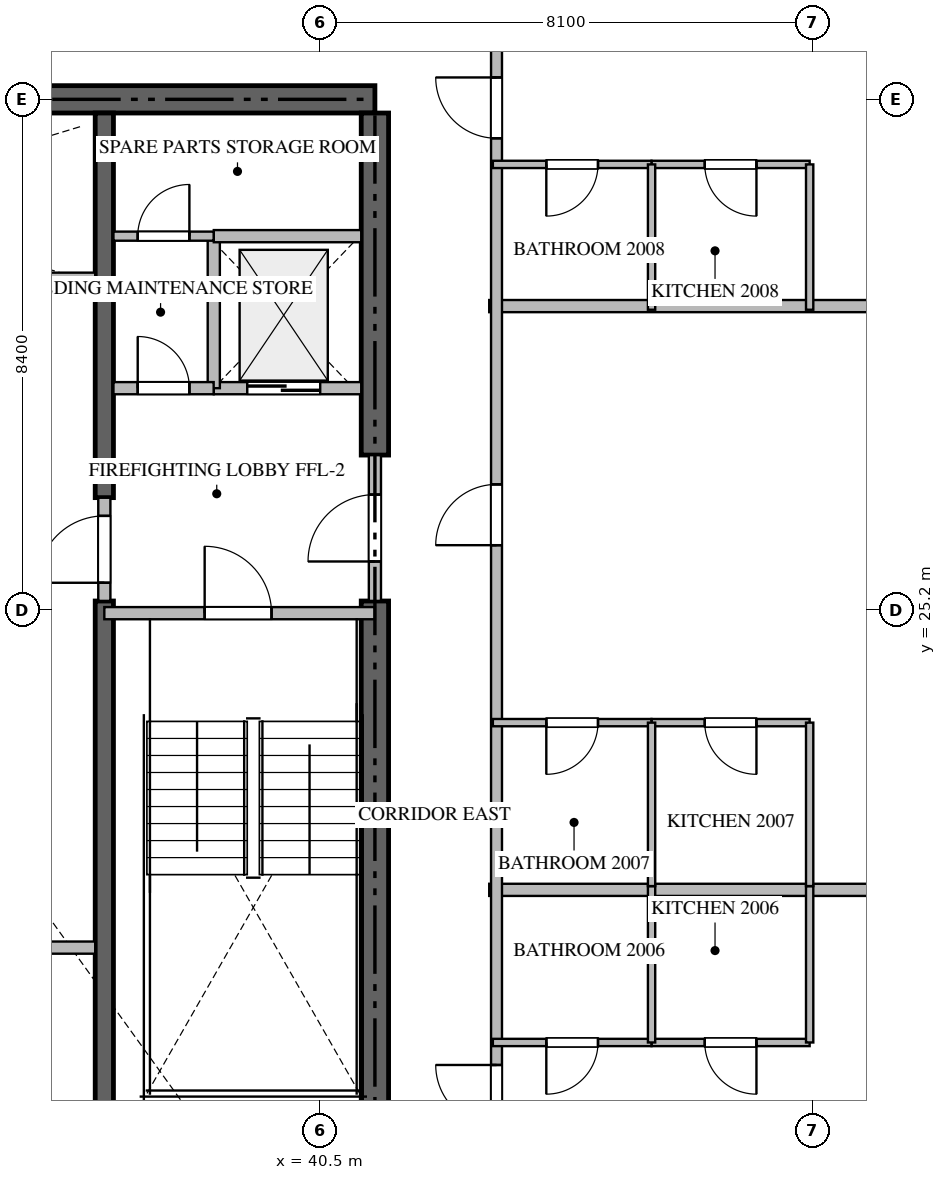
"""IFC4 building model, lengths in metres.
Left out: names, types, materials, properties, quantities, classifications, styles, units other than length and angle.
Written with IfcOpenShell. Run it as: python <this file> out.ifc"""

import sys

from ifc_helpers import new_model, si_unit, direction, frame, frame_2d, origin, place, context, subcontext, project, spatial, rectangle, extrude, source, transform, mapped, element, fill, save


model = new_model("IFC4")
c1 = context("Model", 3, precision=1e-05, world=origin(), true_north=direction((0.0, 1.0)))
c2 = subcontext(c1, "Body", "Model", "MODEL_VIEW")
j1 = project(units=[si_unit("LENGTHUNIT", "METRE"), si_unit("PLANEANGLEUNIT", "RADIAN")], contexts=[c1])
p1 = place(None, origin())
s1 = spatial("IfcSite", under=j1, at=p1, CompositionType="ELEMENT")
p2 = place(p1, origin())
s2 = spatial("IfcBuilding", under=s1, at=p2, CompositionType="ELEMENT")
p3 = place(p2, frame((0.0, 0.0, 82.95)))
s3 = spatial("IfcBuildingStorey", under=s2, at=p3, CompositionType="ELEMENT", Elevation=82.95)
p4 = place(p3, frame((41.4, 33.6, -0.26), z_axis=(0.0, 0.0, 1.0), x_axis=(-1.0, 0.0, 0.0)))
e1 = element("IfcWall", 1, at=p4, inside=s3, PredefinedType="SHEAR", context=c2, shape_type="SweptSolid", body=[
    extrude(rectangle(XDim=18.0, YDim=0.45, at=frame_2d((9.0, 0.0))), origin(), (0.0, 0.0, 1.0), 3.748),
])
p5 = place(p3, frame((41.4, 17.025, -0.26), z_axis=(0.0, 0.0, 1.0), x_axis=(0.0, 1.0, 0.0)))
e2 = element("IfcWall", 2, at=p5, inside=s3, PredefinedType="SHEAR", context=c2, shape_type="SweptSolid", body=[
    extrude(rectangle(XDim=8.325, YDim=0.45, at=frame_2d((4.163, 0.0))), origin(), (0.0, 0.0, 1.0), 3.748),
])
p6 = place(p3, frame((41.4, 27.75, -0.26), z_axis=(0.0, 0.0, 1.0), x_axis=(0.0, 1.0, 0.0)))
e3 = element("IfcWall", 3, at=p6, inside=s3, PredefinedType="SHEAR", context=c2, shape_type="SweptSolid", body=[
    extrude(rectangle(XDim=5.625, YDim=0.45, at=frame_2d((2.812, 0.0))), origin(), (0.0, 0.0, 1.0), 3.748),
])
p7 = place(p3, frame((36.95, 17.025, -0.26), z_axis=(0.0, 0.0, 1.0), x_axis=(0.0, 1.0, 0.0)))
e4 = element("IfcWall", 4, at=p7, inside=s3, PredefinedType="SHEAR", context=c2, shape_type="SweptSolid", body=[
    extrude(rectangle(XDim=8.325, YDim=0.3, at=frame_2d((4.163, 0.0))), origin(), (0.0, 0.0, 1.0), 3.748),
])
p8 = place(p3, frame((36.95, 27.05, -0.26), z_axis=(0.0, 0.0, 1.0), x_axis=(0.0, 1.0, 0.0)))
e5 = element("IfcWall", 5, at=p8, inside=s3, PredefinedType="SHEAR", context=c2, shape_type="SweptSolid", body=[
    extrude(rectangle(XDim=6.325, YDim=0.3, at=frame_2d((3.163, 0.0))), origin(), (0.0, 0.0, 1.0), 3.748),
])
p9 = place(p3, frame((36.95, 25.15, 0.0), z_axis=(0.0, 0.0, 1.0), x_axis=(1.0, 0.0, 0.0)))
e6 = element("IfcWall", 6, at=p9, inside=s3, PredefinedType="STANDARD", context=c2, shape_type="SweptSolid", body=[
    extrude(rectangle(XDim=4.45, YDim=0.2, at=frame_2d((2.225, 0.0))), origin(), (0.0, 0.0, 1.0), 3.49),
])
p10 = place(p9, frame((1.65, 0.0, 0.0)))
e7 = element("IfcOpeningElement", 7, at=p10, cuts=e6, PredefinedType="OPENING", context=c2, shape_type="SweptSolid", body=[
    extrude(rectangle(XDim=1.1, YDim=2.15, at=frame_2d((0.55, 1.075))), frame((0.0, 0.11, 0.0), z_axis=(0.0, -1.0, 0.0), x_axis=(1.0, 0.0, 0.0)), (0.0, 0.0, 1.0), 0.22),
])
p11 = place(p3, frame((38.75, 28.85, 0.0), z_axis=(0.0, 0.0, 1.0), x_axis=(1.0, 0.0, 0.0)))
e8 = element("IfcWall", 8, at=p11, inside=s3, PredefinedType="STANDARD", context=c2, shape_type="SweptSolid", body=[
    extrude(rectangle(XDim=2.425, YDim=0.2, at=frame_2d((1.212, 0.0))), origin(), (0.0, 0.0, 1.0), 3.49),
])
p12 = place(p11, frame((0.55, 0.0, 0.0)))
e9 = element("IfcOpeningElement", 9, at=p12, cuts=e8, PredefinedType="OPENING", context=c2, shape_type="SweptSolid", body=[
    extrude(rectangle(XDim=1.2, YDim=2.2, at=frame_2d((0.6, 1.1))), frame((0.0, 0.11, 0.0), z_axis=(0.0, -1.0, 0.0), x_axis=(1.0, 0.0, 0.0)), (0.0, 0.0, 1.0), 0.22),
])
p13 = place(p3, frame((33.05, 19.65, 0.0), z_axis=(0.0, 0.0, 1.0), x_axis=(1.0, 0.0, 0.0)))
e10 = element("IfcWall", 10, at=p13, inside=s3, PredefinedType="STANDARD", context=c2, shape_type="SweptSolid", body=[
    extrude(rectangle(XDim=3.75, YDim=0.2, at=frame_2d((1.875, 0.0))), origin(), (0.0, 0.0, 1.0), 3.49),
])
p14 = place(p13, frame((0.65, 0.0, 0.0)))
e11 = element("IfcOpeningElement", 11, at=p14, cuts=e10, PredefinedType="OPENING", context=c2, shape_type="SweptSolid", body=[
    extrude(rectangle(XDim=1.1, YDim=2.2, at=frame_2d((0.55, 1.1))), frame((0.0, 0.11, 0.0), z_axis=(0.0, -1.0, 0.0), x_axis=(1.0, 0.0, 0.0)), (0.0, 0.0, 1.0), 0.22),
])
p15 = place(p3, frame((35.0, 30.65, 0.0), z_axis=(0.0, 0.0, 1.0), x_axis=(1.0, 0.0, 0.0)))
e12 = element("IfcWall", 12, at=p15, inside=s3, PredefinedType="STANDARD", context=c2, shape_type="SweptSolid", body=[
    extrude(rectangle(XDim=1.8, YDim=0.2, at=frame_2d((0.9, 0.0))), origin(), (0.0, 0.0, 1.0), 3.49),
])
p16 = place(p3, frame((38.75, 28.85, 0.0), z_axis=(0.0, 0.0, 1.0), x_axis=(0.0, 1.0, 0.0)))
e13 = element("IfcWall", 13, at=p16, inside=s3, PredefinedType="STANDARD", context=c2, shape_type="SweptSolid", body=[
    extrude(rectangle(XDim=2.5, YDim=0.2, at=frame_2d((1.25, 0.0))), origin(), (0.0, 0.0, 1.0), 3.49),
])
p17 = place(p3, frame((38.75, 31.35, 0.0), z_axis=(0.0, 0.0, 1.0), x_axis=(1.0, 0.0, 0.0)))
e14 = element("IfcWall", 14, at=p17, inside=s3, PredefinedType="STANDARD", context=c2, shape_type="SweptSolid", body=[
    extrude(rectangle(XDim=2.425, YDim=0.2, at=frame_2d((1.212, 0.0))), origin(), (0.0, 0.0, 1.0), 3.49),
])
p18 = place(p3, frame((37.1, 28.85, 0.0), z_axis=(0.0, 0.0, 1.0), x_axis=(1.0, 0.0, 0.0)))
e15 = element("IfcWall", 15, at=p18, inside=s3, PredefinedType="STANDARD", context=c2, shape_type="SweptSolid", body=[
    extrude(rectangle(XDim=1.648, YDim=0.2, at=frame_2d((0.824, 0.0))), origin(), (0.0, 0.0, 1.0), 3.49),
])
p19 = place(p18, frame((0.399, 0.0, 0.0)))
e16 = element("IfcOpeningElement", 16, at=p19, cuts=e15, PredefinedType="OPENING", context=c2, shape_type="SweptSolid", body=[
    extrude(rectangle(XDim=0.85, YDim=2.1, at=frame_2d((0.425, 1.05))), frame((0.0, 0.11, 0.0), z_axis=(0.0, -1.0, 0.0), x_axis=(1.0, 0.0, 0.0)), (0.0, 0.0, 1.0), 0.22),
])
p20 = place(p3, frame((41.4, 25.352, 0.0), z_axis=(0.0, 0.0, 1.0), x_axis=(0.0, 1.0, 0.0)))
e17 = element("IfcWall", 17, at=p20, inside=s3, PredefinedType="STANDARD", context=c2, shape_type="SweptSolid", body=[
    extrude(rectangle(XDim=2.396, YDim=0.2, at=frame_2d((1.198, 0.0))), origin(), (0.0, 0.0, 1.0), 3.49),
])
p21 = place(p20, frame((0.648, 0.0, 0.0)))
e18 = element("IfcOpeningElement", 18, at=p21, cuts=e17, PredefinedType="OPENING", context=c2, shape_type="SweptSolid", body=[
    extrude(rectangle(XDim=1.1, YDim=2.15, at=frame_2d((0.55, 1.075))), frame((0.0, 0.11, 0.0), z_axis=(0.0, -1.0, 0.0), x_axis=(1.0, 0.0, 0.0)), (0.0, 0.0, 1.0), 0.22),
])
p22 = place(p3, frame((36.95, 25.352, 0.0), z_axis=(0.0, 0.0, 1.0), x_axis=(0.0, 1.0, 0.0)))
e19 = element("IfcWall", 19, at=p22, inside=s3, PredefinedType="STANDARD", context=c2, shape_type="SweptSolid", body=[
    extrude(rectangle(XDim=1.696, YDim=0.2, at=frame_2d((0.848, 0.0))), origin(), (0.0, 0.0, 1.0), 3.49),
])
p23 = place(p22, frame((0.298, 0.0, 0.0)))
e20 = element("IfcOpeningElement", 20, at=p23, cuts=e19, PredefinedType="OPENING", context=c2, shape_type="SweptSolid", body=[
    extrude(rectangle(XDim=1.1, YDim=2.15, at=frame_2d((0.55, 1.075))), frame((0.0, 0.11, 0.0), z_axis=(0.0, -1.0, 0.0), x_axis=(1.0, 0.0, 0.0)), (0.0, 0.0, 1.0), 0.22),
])
p24 = place(p3, frame((37.1, 31.35, 0.0), z_axis=(0.0, 0.0, 1.0), x_axis=(1.0, 0.0, 0.0)))
e21 = element("IfcWall", 21, at=p24, inside=s3, PredefinedType="PARTITIONING", context=c2, shape_type="SweptSolid", body=[
    extrude(rectangle(XDim=1.648, YDim=0.15, at=frame_2d((0.824, 0.0))), origin(), (0.0, 0.0, 1.0), 3.49),
])
p25 = place(p24, frame((0.399, 0.0, 0.0)))
e22 = element("IfcOpeningElement", 22, at=p25, cuts=e21, PredefinedType="OPENING", context=c2, shape_type="SweptSolid", body=[
    extrude(rectangle(XDim=0.85, YDim=2.1, at=frame_2d((0.425, 1.05))), frame((0.0, 0.085, 0.0), z_axis=(0.0, -1.0, 0.0), x_axis=(1.0, 0.0, 0.0)), (0.0, 0.0, 1.0), 0.17),
])
for number, where, z_axis, x_axis in (
    (23, (43.28, 20.6, 0.0), (0.0, 0.0, 1.0), (1.0, 0.0, 0.0)),
    (24, (43.28, 30.2, 0.0), (0.0, 0.0, 1.0), (1.0, 0.0, 0.0)),
):
    element("IfcWall", number, at=place(p3, frame(where, z_axis=z_axis, x_axis=x_axis)), inside=s3, PredefinedType="PARTITIONING", context=c2, shape_type="SweptSolid", body=[
        extrude(rectangle(XDim=15.438, YDim=0.2, at=frame_2d((7.719, 0.0))), origin(), (0.0, 0.0, 1.0), 3.49),
    ])
p26 = place(p3, frame((43.4, 14.9, 0.0), z_axis=(0.0, 0.0, 1.0), x_axis=(0.0, 1.0, 0.0)))
e25 = element("IfcWall", 25, at=p26, inside=s3, PredefinedType="PARTITIONING", context=c2, shape_type="SweptSolid", body=[
    extrude(rectangle(XDim=20.6, YDim=0.18, at=frame_2d((10.3, 0.0))), origin(), (0.0, 0.0, 1.0), 3.49),
])
p27 = place(p26, frame((1.82, 0.0, 0.0)))
e26 = element("IfcOpeningElement", 26, at=p27, cuts=e25, PredefinedType="OPENING", context=c2, shape_type="SweptSolid", body=[
    extrude(rectangle(XDim=1.0, YDim=2.15, at=frame_2d((0.5, 1.075))), frame((0.0, 0.1, 0.0), z_axis=(0.0, -1.0, 0.0), x_axis=(1.0, 0.0, 0.0)), (0.0, 0.0, 1.0), 0.2),
])
p28 = place(p26, frame((11.368, 0.0, 0.0)))
e27 = element("IfcOpeningElement", 27, at=p28, cuts=e25, PredefinedType="OPENING", context=c2, shape_type="SweptSolid", body=[
    extrude(rectangle(XDim=1.0, YDim=2.15, at=frame_2d((0.5, 1.075))), frame((0.0, 0.1, 0.0), z_axis=(0.0, -1.0, 0.0), x_axis=(1.0, 0.0, 0.0)), (0.0, 0.0, 1.0), 0.2),
])
p29 = place(p26, frame((18.06, 0.0, 0.0)))
e28 = element("IfcOpeningElement", 28, at=p29, cuts=e25, PredefinedType="OPENING", context=c2, shape_type="SweptSolid", body=[
    extrude(rectangle(XDim=1.0, YDim=2.15, at=frame_2d((0.5, 1.075))), frame((0.0, 0.1, 0.0), z_axis=(0.0, -1.0, 0.0), x_axis=(1.0, 0.0, 0.0)), (0.0, 0.0, 1.0), 0.2),
])
p30 = place(p3, frame((48.55, 18.09, 0.0), z_axis=(0.0, 0.0, 1.0), x_axis=(-1.0, 0.0, 0.0)))
e29 = element("IfcWall", 29, at=p30, inside=s3, PredefinedType="PARTITIONING", context=c2, shape_type="SweptSolid", body=[
    extrude(rectangle(XDim=2.6, YDim=0.12, at=frame_2d((1.3, 0.0))), origin(), (0.0, 0.0, 1.0), 3.49),
])
p31 = place(p30, frame((0.875, 0.0, 0.0)))
e30 = element("IfcOpeningElement", 30, at=p31, cuts=e29, PredefinedType="OPENING", context=c2, shape_type="SweptSolid", body=[
    extrude(rectangle(XDim=0.85, YDim=2.1, at=frame_2d((0.425, 1.05))), frame((0.0, 0.07, 0.0), z_axis=(0.0, -1.0, 0.0), x_axis=(1.0, 0.0, 0.0)), (0.0, 0.0, 1.0), 0.14),
])
p32 = place(p3, frame((45.948, 18.09, 0.0), z_axis=(0.0, 0.0, 1.0), x_axis=(-1.0, 0.0, 0.0)))
e31 = element("IfcWall", 31, at=p32, inside=s3, PredefinedType="PARTITIONING", context=c2, shape_type="SweptSolid", body=[
    extrude(rectangle(XDim=2.608, YDim=0.12, at=frame_2d((1.304, 0.0))), origin(), (0.0, 0.0, 1.0), 3.49),
])
p33 = place(p32, frame((0.879, 0.0, 0.0)))
e32 = element("IfcOpeningElement", 32, at=p33, cuts=e31, PredefinedType="OPENING", context=c2, shape_type="SweptSolid", body=[
    extrude(rectangle(XDim=0.85, YDim=2.1, at=frame_2d((0.425, 1.05))), frame((0.0, 0.07, 0.0), z_axis=(0.0, -1.0, 0.0), x_axis=(1.0, 0.0, 0.0)), (0.0, 0.0, 1.0), 0.14),
])
for number, where, z_axis, x_axis in (
    (33, (45.95, 18.09, 0.0), (0.0, 0.0, 1.0), (0.0, 1.0, 0.0)),
    (34, (48.55, 18.09, 0.0), (0.0, 0.0, 1.0), (0.0, 1.0, 0.0)),
):
    element("IfcWall", number, at=place(p3, frame(where, z_axis=z_axis, x_axis=x_axis)), inside=s3, PredefinedType="PARTITIONING", context=c2, shape_type="SweptSolid", body=[
        extrude(rectangle(XDim=2.57, YDim=0.12, at=frame_2d((1.285, 0.0))), origin(), (0.0, 0.0, 1.0), 3.49),
    ])
p34 = place(p3, frame((48.55, 23.35, 0.0), z_axis=(0.0, 0.0, 1.0), x_axis=(-1.0, 0.0, 0.0)))
e35 = element("IfcWall", 35, at=p34, inside=s3, PredefinedType="PARTITIONING", context=c2, shape_type="SweptSolid", body=[
    extrude(rectangle(XDim=2.6, YDim=0.12, at=frame_2d((1.3, 0.0))), origin(), (0.0, 0.0, 1.0), 3.49),
])
p35 = place(p34, frame((0.875, 0.0, 0.0)))
e36 = element("IfcOpeningElement", 36, at=p35, cuts=e35, PredefinedType="OPENING", context=c2, shape_type="SweptSolid", body=[
    extrude(rectangle(XDim=0.85, YDim=2.1, at=frame_2d((0.425, 1.05))), frame((0.0, 0.07, 0.0), z_axis=(0.0, -1.0, 0.0), x_axis=(1.0, 0.0, 0.0)), (0.0, 0.0, 1.0), 0.14),
])
p36 = place(p3, frame((45.948, 23.35, 0.0), z_axis=(0.0, 0.0, 1.0), x_axis=(-1.0, 0.0, 0.0)))
e37 = element("IfcWall", 37, at=p36, inside=s3, PredefinedType="PARTITIONING", context=c2, shape_type="SweptSolid", body=[
    extrude(rectangle(XDim=2.608, YDim=0.12, at=frame_2d((1.304, 0.0))), origin(), (0.0, 0.0, 1.0), 3.49),
])
p37 = place(p36, frame((0.879, 0.0, 0.0)))
e38 = element("IfcOpeningElement", 38, at=p37, cuts=e37, PredefinedType="OPENING", context=c2, shape_type="SweptSolid", body=[
    extrude(rectangle(XDim=0.85, YDim=2.1, at=frame_2d((0.425, 1.05))), frame((0.0, 0.07, 0.0), z_axis=(0.0, -1.0, 0.0), x_axis=(1.0, 0.0, 0.0)), (0.0, 0.0, 1.0), 0.14),
])
for number, where, z_axis, x_axis in (
    (39, (45.95, 20.662, 0.0), (0.0, 0.0, 1.0), (0.0, 1.0, 0.0)),
    (40, (48.55, 20.662, 0.0), (0.0, 0.0, 1.0), (0.0, 1.0, 0.0)),
):
    element("IfcWall", number, at=place(p3, frame(where, z_axis=z_axis, x_axis=x_axis)), inside=s3, PredefinedType="PARTITIONING", context=c2, shape_type="SweptSolid", body=[
        extrude(rectangle(XDim=2.688, YDim=0.12, at=frame_2d((1.344, 0.0))), origin(), (0.0, 0.0, 1.0), 3.49),
    ])
p38 = place(p3, frame((48.55, 32.53, 0.0), z_axis=(0.0, 0.0, 1.0), x_axis=(-1.0, 0.0, 0.0)))
e41 = element("IfcWall", 41, at=p38, inside=s3, PredefinedType="PARTITIONING", context=c2, shape_type="SweptSolid", body=[
    extrude(rectangle(XDim=2.6, YDim=0.12, at=frame_2d((1.3, 0.0))), origin(), (0.0, 0.0, 1.0), 3.49),
])
p39 = place(p38, frame((0.875, 0.0, 0.0)))
e42 = element("IfcOpeningElement", 42, at=p39, cuts=e41, PredefinedType="OPENING", context=c2, shape_type="SweptSolid", body=[
    extrude(rectangle(XDim=0.85, YDim=2.1, at=frame_2d((0.425, 1.05))), frame((0.0, 0.07, 0.0), z_axis=(0.0, -1.0, 0.0), x_axis=(1.0, 0.0, 0.0)), (0.0, 0.0, 1.0), 0.14),
])
p40 = place(p3, frame((45.948, 32.53, 0.0), z_axis=(0.0, 0.0, 1.0), x_axis=(-1.0, 0.0, 0.0)))
e43 = element("IfcWall", 43, at=p40, inside=s3, PredefinedType="PARTITIONING", context=c2, shape_type="SweptSolid", body=[
    extrude(rectangle(XDim=2.608, YDim=0.12, at=frame_2d((1.304, 0.0))), origin(), (0.0, 0.0, 1.0), 3.49),
])
p41 = place(p40, frame((0.879, 0.0, 0.0)))
e44 = element("IfcOpeningElement", 44, at=p41, cuts=e43, PredefinedType="OPENING", context=c2, shape_type="SweptSolid", body=[
    extrude(rectangle(XDim=0.85, YDim=2.1, at=frame_2d((0.425, 1.05))), frame((0.0, 0.07, 0.0), z_axis=(0.0, -1.0, 0.0), x_axis=(1.0, 0.0, 0.0)), (0.0, 0.0, 1.0), 0.14),
])
for number, where, z_axis, x_axis in (
    (45, (45.95, 30.14, 0.0), (0.0, 0.0, 1.0), (0.0, 1.0, 0.0)),
    (46, (48.55, 30.14, 0.0), (0.0, 0.0, 1.0), (0.0, 1.0, 0.0)),
):
    element("IfcWall", number, at=place(p3, frame(where, z_axis=z_axis, x_axis=x_axis)), inside=s3, PredefinedType="PARTITIONING", context=c2, shape_type="SweptSolid", body=[
        extrude(rectangle(XDim=2.39, YDim=0.12, at=frame_2d((1.195, 0.0))), origin(), (0.0, 0.0, 1.0), 3.49),
    ])
m1 = source(origin(), c2, "Body", "SweptSolid", [
    extrude(rectangle(XDim=1.1, YDim=2.15, at=frame_2d((0.55, 1.075))), frame((0.0, 0.025, 0.0), z_axis=(0.0, -1.0, 0.0), x_axis=(1.0, 0.0, 0.0)), (0.0, 0.0, 1.0), 0.05),
])
p42 = place(p10, origin())
e47 = element("IfcDoor", 47, at=p42, inside=s3, OperationType="SINGLE_SWING_LEFT", PredefinedType="DOOR", context=c2, shape_type="MappedRepresentation", body=[
    mapped(m1, transform((0.0, 0.0, 0.0), scale=1.0)),
])
fill(e7, e47)
m2 = source(origin(), c2, "Body", "SweptSolid", [
    extrude(rectangle(XDim=1.2, YDim=2.2, at=frame_2d((0.6, 1.1))), frame((0.0, 0.025, 0.0), z_axis=(0.0, -1.0, 0.0), x_axis=(1.0, 0.0, 0.0)), (0.0, 0.0, 1.0), 0.05),
])
p43 = place(p12, origin())
e48 = element("IfcDoor", 48, at=p43, inside=s3, OperationType="DOUBLE_DOOR_SLIDING", PredefinedType="DOOR", context=c2, shape_type="MappedRepresentation", body=[
    mapped(m2, transform((0.0, 0.0, 0.0), scale=1.0)),
])
fill(e9, e48)
m3 = source(origin(), c2, "Body", "SweptSolid", [
    extrude(rectangle(XDim=0.85, YDim=2.1, at=frame_2d((0.425, 1.05))), frame((0.0, 0.025, 0.0), z_axis=(0.0, -1.0, 0.0), x_axis=(1.0, 0.0, 0.0)), (0.0, 0.0, 1.0), 0.05),
])
p44 = place(p19, origin())
e49 = element("IfcDoor", 49, at=p44, inside=s3, OperationType="SINGLE_SWING_LEFT", PredefinedType="DOOR", context=c2, shape_type="MappedRepresentation", body=[
    mapped(m3, transform((0.0, 0.0, 0.0), scale=1.0)),
])
fill(e16, e49)
p45 = place(p21, origin())
e50 = element("IfcDoor", 50, at=p45, inside=s3, OperationType="SINGLE_SWING_LEFT", PredefinedType="DOOR", context=c2, shape_type="MappedRepresentation", body=[
    mapped(m1, transform((0.0, 0.0, 0.0), scale=1.0)),
])
fill(e18, e50)
p46 = place(p23, origin())
e51 = element("IfcDoor", 51, at=p46, inside=s3, OperationType="SINGLE_SWING_LEFT", PredefinedType="DOOR", context=c2, shape_type="MappedRepresentation", body=[
    mapped(m1, transform((0.0, 0.0, 0.0), scale=1.0)),
])
fill(e20, e51)
p47 = place(p25, origin())
e52 = element("IfcDoor", 52, at=p47, inside=s3, OperationType="SINGLE_SWING_RIGHT", PredefinedType="DOOR", context=c2, shape_type="MappedRepresentation", body=[
    mapped(m3, transform((0.0, 0.0, 0.0), scale=1.0)),
])
fill(e22, e52)
m4 = source(origin(), c2, "Body", "SweptSolid", [
    extrude(rectangle(XDim=1.0, YDim=2.15, at=frame_2d((0.5, 1.075))), frame((0.0, 0.025, 0.0), z_axis=(0.0, -1.0, 0.0), x_axis=(1.0, 0.0, 0.0)), (0.0, 0.0, 1.0), 0.05),
])
p48 = place(p27, origin())
e53 = element("IfcDoor", 53, at=p48, inside=s3, OperationType="SINGLE_SWING_RIGHT", PredefinedType="DOOR", context=c2, shape_type="MappedRepresentation", body=[
    mapped(m4, transform((0.0, 0.0, 0.0), scale=1.0)),
])
fill(e26, e53)
p49 = place(p28, origin())
e54 = element("IfcDoor", 54, at=p49, inside=s3, OperationType="SINGLE_SWING_LEFT", PredefinedType="DOOR", context=c2, shape_type="MappedRepresentation", body=[
    mapped(m4, transform((0.0, 0.0, 0.0), scale=1.0)),
])
fill(e27, e54)
p50 = place(p29, origin())
e55 = element("IfcDoor", 55, at=p50, inside=s3, OperationType="SINGLE_SWING_RIGHT", PredefinedType="DOOR", context=c2, shape_type="MappedRepresentation", body=[
    mapped(m4, transform((0.0, 0.0, 0.0), scale=1.0)),
])
fill(e28, e55)
p51 = place(p31, origin())
e56 = element("IfcDoor", 56, at=p51, inside=s3, OperationType="SINGLE_SWING_LEFT", PredefinedType="DOOR", context=c2, shape_type="MappedRepresentation", body=[
    mapped(m3, transform((0.0, 0.0, 0.0), scale=1.0)),
])
fill(e30, e56)
p52 = place(p33, origin())
e57 = element("IfcDoor", 57, at=p52, inside=s3, OperationType="SINGLE_SWING_RIGHT", PredefinedType="DOOR", context=c2, shape_type="MappedRepresentation", body=[
    mapped(m3, transform((0.0, 0.0, 0.0), scale=1.0)),
])
fill(e32, e57)
p53 = place(p35, origin())
e58 = element("IfcDoor", 58, at=p53, inside=s3, OperationType="SINGLE_SWING_LEFT", PredefinedType="DOOR", context=c2, shape_type="MappedRepresentation", body=[
    mapped(m3, transform((0.0, 0.0, 0.0), scale=1.0)),
])
fill(e36, e58)
p54 = place(p37, origin())
e59 = element("IfcDoor", 59, at=p54, inside=s3, OperationType="SINGLE_SWING_RIGHT", PredefinedType="DOOR", context=c2, shape_type="MappedRepresentation", body=[
    mapped(m3, transform((0.0, 0.0, 0.0), scale=1.0)),
])
fill(e38, e59)
p55 = place(p39, origin())
e60 = element("IfcDoor", 60, at=p55, inside=s3, OperationType="SINGLE_SWING_LEFT", PredefinedType="DOOR", context=c2, shape_type="MappedRepresentation", body=[
    mapped(m3, transform((0.0, 0.0, 0.0), scale=1.0)),
])
fill(e42, e60)
p56 = place(p41, origin())
e61 = element("IfcDoor", 61, at=p56, inside=s3, OperationType="SINGLE_SWING_RIGHT", PredefinedType="DOOR", context=c2, shape_type="MappedRepresentation", body=[
    mapped(m3, transform((0.0, 0.0, 0.0), scale=1.0)),
])
fill(e44, e61)
save(model, sys.argv[1])
